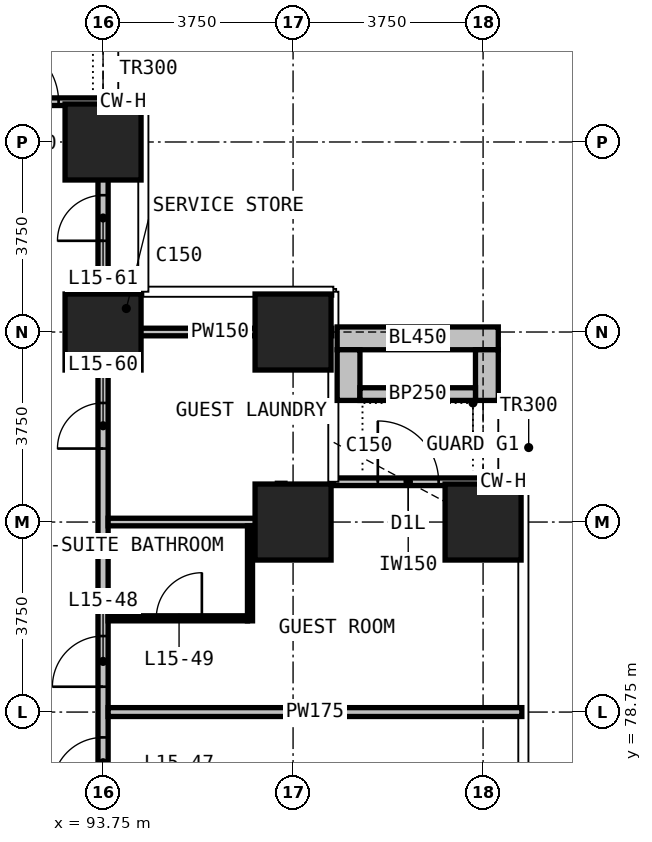
"""IFC4 building model, lengths in metres.
Left out: names, types, materials, properties, quantities, classifications, styles, units other than length and angle.
Written with IfcOpenShell. Run it as: python <this file> out.ifc"""

import sys

from ifc_helpers import new_model, si_unit, direction, frame, frame_2d, origin, origin_2d, place, context, subcontext, project, spatial, rectangle, extrude, element, fill, save


model = new_model("IFC4")
c1 = context("Model", 3, precision=1e-05, world=origin(), true_north=direction((0.0, 1.0)))
c2 = subcontext(c1, "Body", "Model", "MODEL_VIEW")
j1 = project(units=[si_unit("LENGTHUNIT", "METRE"), si_unit("PLANEANGLEUNIT", "RADIAN")], contexts=[c1])
p1 = place(None, origin())
s1 = spatial("IfcSite", under=j1, at=p1, CompositionType="ELEMENT")
p2 = place(p1, origin())
s2 = spatial("IfcBuilding", under=s1, at=p2, CompositionType="ELEMENT")
p3 = place(p2, frame((0.0, 0.0, 69.2)))
s3 = spatial("IfcBuildingStorey", under=s2, at=p3, CompositionType="ELEMENT", Elevation=69.2)
for number, where, z_axis, x_axis in (
    (1, (93.75, 86.25, 0.0), (0.0, 0.0, 1.0), (1.0, 0.0, 0.0)),
    (2, (93.75, 90.0, 0.0), (0.0, 0.0, 1.0), (1.0, 0.0, 0.0)),
    (3, (97.5, 82.5, 0.0), (0.0, 0.0, 1.0), (1.0, 0.0, 0.0)),
    (4, (97.5, 86.25, 0.0), (0.0, 0.0, 1.0), (1.0, 0.0, 0.0)),
    (5, (101.25, 82.5, 0.0), (0.0, 0.0, 1.0), (1.0, 0.0, 0.0)),
):
    element("IfcColumn", number, at=place(p3, frame(where, z_axis=z_axis, x_axis=x_axis)), inside=s3, PredefinedType="COLUMN", context=c2, shape_type="SweptSolid", body=[
        extrude(rectangle(XDim=1.5, YDim=1.5, at=origin_2d()), origin(), (0.0, 0.0, 1.0), 3.3),
    ])
p4 = place(p3, frame((98.295, 83.295, 0.0), z_axis=(0.0, 0.0, 1.0), x_axis=(1.0, 0.0, 0.0)))
e6 = element("IfcWall", 6, at=p4, inside=s3, PredefinedType="SOLIDWALL", context=c2, shape_type="SweptSolid", body=[
    extrude(rectangle(XDim=2.955, YDim=0.15, at=frame_2d((1.478, 0.0))), origin(), (0.0, 0.0, 1.0), 3.0),
])
p5 = place(p4, frame((0.877, 0.0, 0.0)))
e7 = element("IfcOpeningElement", 7, at=p5, cuts=e6, PredefinedType="OPENING", context=c2, shape_type="SweptSolid", body=[
    extrude(rectangle(XDim=1.2, YDim=2.0, at=frame_2d((0.6, 1.0))), frame((0.0, 0.085, 0.0), z_axis=(0.0, -1.0, 0.0), x_axis=(1.0, 0.0, 0.0)), (0.0, 0.0, 1.0), 0.17),
])
p6 = place(p3, frame((90.795, 90.795, 0.0), z_axis=(0.0, 0.0, 1.0), x_axis=(1.0, 0.0, 0.0)))
e8 = element("IfcWall", 8, at=p6, inside=s3, PredefinedType="SOLIDWALL", context=c2, shape_type="SweptSolid", body=[
    extrude(rectangle(XDim=2.955, YDim=0.15, at=frame_2d((1.478, 0.0))), origin(), (0.0, 0.0, 1.0), 3.0),
])
p7 = place(p6, frame((0.877, 0.0, 0.0)))
e9 = element("IfcOpeningElement", 9, at=p7, cuts=e8, PredefinedType="OPENING", context=c2, shape_type="SweptSolid", body=[
    extrude(rectangle(XDim=1.2, YDim=2.4, at=frame_2d((0.6, 1.2))), frame((0.0, 0.085, 0.0), z_axis=(0.0, -1.0, 0.0), x_axis=(1.0, 0.0, 0.0)), (0.0, 0.0, 1.0), 0.17),
])
p8 = place(p3, frame((98.37, 86.125, 0.0), z_axis=(0.0, 0.0, 1.0), x_axis=(1.0, 0.0, 0.0)))
e10 = element("IfcWall", 10, at=p8, inside=s3, PredefinedType="USERDEFINED", context=c2, shape_type="SweptSolid", body=[
    extrude(rectangle(XDim=3.18, YDim=0.45, at=frame_2d((1.59, 0.0))), origin(), (0.0, 0.0, 1.0), 1.1),
])
for number, where, z_axis, x_axis in (
    (11, (98.595, 84.9, 0.0), (0.0, 0.0, 1.0), (0.0, 1.0, 0.0)),
    (12, (101.325, 84.9, 0.0), (0.0, 0.0, 1.0), (0.0, 1.0, 0.0)),
):
    element("IfcWall", number, at=place(p3, frame(where, z_axis=z_axis, x_axis=x_axis)), inside=s3, PredefinedType="USERDEFINED", context=c2, shape_type="SweptSolid", body=[
        extrude(rectangle(XDim=1.0, YDim=0.45, at=frame_2d((0.5, 0.0))), origin(), (0.0, 0.0, 1.0), 1.1),
    ])
p9 = place(p3, frame((98.82, 85.025, 0.0), z_axis=(0.0, 0.0, 1.0), x_axis=(1.0, 0.0, 0.0)))
e13 = element("IfcWall", 13, at=p9, inside=s3, PredefinedType="USERDEFINED", context=c2, shape_type="SweptSolid", body=[
    extrude(rectangle(XDim=2.28, YDim=0.25, at=frame_2d((1.14, 0.0))), origin(), (0.0, 0.0, 1.0), 1.0),
])
p10 = place(p3, frame((93.75, 52.4, 0.0), z_axis=(0.0, 0.0, 1.0), x_axis=(0.0, 1.0, 0.0)))
e14 = element("IfcWall", 14, at=p10, inside=s3, PredefinedType="PARTITIONING", context=c2, shape_type="SweptSolid", body=[
    extrude(rectangle(XDim=38.31, YDim=0.2, at=frame_2d((19.155, 0.0))), origin(), (0.0, 0.0, 1.0), 3.0),
])
p11 = place(p10, frame((5.5, 0.0, 0.0)))
e15 = element("IfcOpeningElement", 15, at=p11, cuts=e14, PredefinedType="OPENING", context=c2, shape_type="SweptSolid", body=[
    extrude(rectangle(XDim=1.0, YDim=2.2, at=frame_2d((0.5, 1.1))), frame((0.0, 0.11, 0.0), z_axis=(0.0, -1.0, 0.0), x_axis=(1.0, 0.0, 0.0)), (0.0, 0.0, 1.0), 0.22),
])
p12 = place(p10, frame((8.1, 0.0, 0.0)))
e16 = element("IfcOpeningElement", 16, at=p12, cuts=e14, PredefinedType="OPENING", context=c2, shape_type="SweptSolid", body=[
    extrude(rectangle(XDim=1.0, YDim=2.2, at=frame_2d((0.5, 1.1))), frame((0.0, 0.11, 0.0), z_axis=(0.0, -1.0, 0.0), x_axis=(1.0, 0.0, 0.0)), (0.0, 0.0, 1.0), 0.22),
])
p13 = place(p10, frame((13.6, 0.0, 0.0)))
e17 = element("IfcOpeningElement", 17, at=p13, cuts=e14, PredefinedType="OPENING", context=c2, shape_type="SweptSolid", body=[
    extrude(rectangle(XDim=1.0, YDim=2.2, at=frame_2d((0.5, 1.1))), frame((0.0, 0.11, 0.0), z_axis=(0.0, -1.0, 0.0), x_axis=(1.0, 0.0, 0.0)), (0.0, 0.0, 1.0), 0.22),
])
p14 = place(p10, frame((16.2, 0.0, 0.0)))
e18 = element("IfcOpeningElement", 18, at=p14, cuts=e14, PredefinedType="OPENING", context=c2, shape_type="SweptSolid", body=[
    extrude(rectangle(XDim=1.0, YDim=2.2, at=frame_2d((0.5, 1.1))), frame((0.0, 0.11, 0.0), z_axis=(0.0, -1.0, 0.0), x_axis=(1.0, 0.0, 0.0)), (0.0, 0.0, 1.0), 0.22),
])
p15 = place(p10, frame((24.85, 0.0, 0.0)))
e19 = element("IfcOpeningElement", 19, at=p15, cuts=e14, PredefinedType="OPENING", context=c2, shape_type="SweptSolid", body=[
    extrude(rectangle(XDim=1.0, YDim=2.2, at=frame_2d((0.5, 1.1))), frame((0.0, 0.11, 0.0), z_axis=(0.0, -1.0, 0.0), x_axis=(1.0, 0.0, 0.0)), (0.0, 0.0, 1.0), 0.22),
])
p16 = place(p10, frame((26.85, 0.0, 0.0)))
e20 = element("IfcOpeningElement", 20, at=p16, cuts=e14, PredefinedType="OPENING", context=c2, shape_type="SweptSolid", body=[
    extrude(rectangle(XDim=1.0, YDim=2.2, at=frame_2d((0.5, 1.1))), frame((0.0, 0.11, 0.0), z_axis=(0.0, -1.0, 0.0), x_axis=(1.0, 0.0, 0.0)), (0.0, 0.0, 1.0), 0.22),
])
p17 = place(p10, frame((31.55, 0.0, 0.0)))
e21 = element("IfcOpeningElement", 21, at=p17, cuts=e14, PredefinedType="OPENING", context=c2, shape_type="SweptSolid", body=[
    extrude(rectangle(XDim=0.9, YDim=2.2, at=frame_2d((0.45, 1.1))), frame((0.0, 0.11, 0.0), z_axis=(0.0, -1.0, 0.0), x_axis=(1.0, 0.0, 0.0)), (0.0, 0.0, 1.0), 0.22),
])
p18 = place(p10, frame((35.65, 0.0, 0.0)))
e22 = element("IfcOpeningElement", 22, at=p18, cuts=e14, PredefinedType="OPENING", context=c2, shape_type="SweptSolid", body=[
    extrude(rectangle(XDim=0.9, YDim=2.2, at=frame_2d((0.45, 1.1))), frame((0.0, 0.11, 0.0), z_axis=(0.0, -1.0, 0.0), x_axis=(1.0, 0.0, 0.0)), (0.0, 0.0, 1.0), 0.22),
])
p19 = place(p3, frame((93.85, 78.75, 0.0), z_axis=(0.0, 0.0, 1.0), x_axis=(1.0, 0.0, 0.0)))
e23 = element("IfcWall", 23, at=p19, inside=s3, PredefinedType="PARTITIONING", context=c2, shape_type="SweptSolid", body=[
    extrude(rectangle(XDim=8.165, YDim=0.175, at=frame_2d((4.083, 0.0))), origin(), (0.0, 0.0, 1.0), 3.0),
])
p20 = place(p3, frame((93.85, 82.5, 0.0), z_axis=(0.0, 0.0, 1.0), x_axis=(1.0, 0.0, 0.0)))
e24 = element("IfcWall", 24, at=p20, inside=s3, PredefinedType="PARTITIONING", context=c2, shape_type="SweptSolid", body=[
    extrude(rectangle(XDim=3.34, YDim=0.15, at=frame_2d((1.67, 0.0))), origin(), (0.0, 0.0, 1.0), 3.0),
])
p21 = place(p3, frame((93.85, 86.25, 0.0), z_axis=(0.0, 0.0, 1.0), x_axis=(1.0, 0.0, 0.0)))
e25 = element("IfcWall", 25, at=p21, inside=s3, PredefinedType="PARTITIONING", context=c2, shape_type="SweptSolid", body=[
    extrude(rectangle(XDim=4.415, YDim=0.15, at=frame_2d((2.208, 0.0))), origin(), (0.0, 0.0, 1.0), 3.0),
])
p22 = place(p3, frame((97.265, 82.425, 0.0), z_axis=(0.0, 0.0, 1.0), x_axis=(0.0, 1.0, 0.0)))
e26 = element("IfcWall", 26, at=p22, inside=s3, PredefinedType="PARTITIONING", context=c2, shape_type="SweptSolid", body=[
    extrude(rectangle(XDim=0.84, YDim=0.15, at=frame_2d((0.42, 0.0))), origin(), (0.0, 0.0, 1.0), 3.0),
])
p23 = place(p3, frame((93.85, 80.6, 0.0), z_axis=(0.0, 0.0, 1.0), x_axis=(1.0, 0.0, 0.0)))
e27 = element("IfcWall", 27, at=p23, inside=s3, PredefinedType="PARTITIONING", context=c2, shape_type="SweptSolid", body=[
    extrude(rectangle(XDim=2.75, YDim=0.1, at=frame_2d((1.375, 0.0))), origin(), (0.0, 0.0, 1.0), 3.0),
])
p24 = place(p23, frame((0.95, 0.0, 0.0)))
e28 = element("IfcOpeningElement", 28, at=p24, cuts=e27, PredefinedType="OPENING", context=c2, shape_type="SweptSolid", body=[
    extrude(rectangle(XDim=0.9, YDim=2.2, at=frame_2d((0.45, 1.1))), frame((0.0, 0.06, 0.0), z_axis=(0.0, -1.0, 0.0), x_axis=(1.0, 0.0, 0.0)), (0.0, 0.0, 1.0), 0.12),
])
p25 = place(p3, frame((96.65, 80.55, 0.0), z_axis=(0.0, 0.0, 1.0), x_axis=(0.0, 1.0, 0.0)))
e29 = element("IfcWall", 29, at=p25, inside=s3, PredefinedType="PARTITIONING", context=c2, shape_type="SweptSolid", body=[
    extrude(rectangle(XDim=1.875, YDim=0.1, at=frame_2d((0.938, 0.0))), origin(), (0.0, 0.0, 1.0), 3.0),
])
p26 = place(p5, origin())
e30 = element("IfcDoor", 30, at=p26, inside=s3, OperationType="SINGLE_SWING_LEFT", PredefinedType="DOOR", context=c2, shape_type="SweptSolid", body=[
    extrude(rectangle(XDim=1.2, YDim=2.0, at=frame_2d((0.6, 1.0))), frame((0.0, 0.025, 0.0), z_axis=(0.0, -1.0, 0.0), x_axis=(1.0, 0.0, 0.0)), (0.0, 0.0, 1.0), 0.05),
])
fill(e7, e30)
p27 = place(p7, origin())
e31 = element("IfcDoor", 31, at=p27, inside=s3, OperationType="SINGLE_SWING_LEFT", PredefinedType="DOOR", context=c2, shape_type="SweptSolid", body=[
    extrude(rectangle(XDim=1.2, YDim=2.4, at=frame_2d((0.6, 1.2))), frame((0.0, 0.025, 0.0), z_axis=(0.0, -1.0, 0.0), x_axis=(1.0, 0.0, 0.0)), (0.0, 0.0, 1.0), 0.05),
])
fill(e9, e31)
p28 = place(p15, origin())
e32 = element("IfcDoor", 32, at=p28, inside=s3, OperationType="SINGLE_SWING_LEFT", PredefinedType="DOOR", context=c2, shape_type="SweptSolid", body=[
    extrude(rectangle(XDim=1.0, YDim=2.2, at=frame_2d((0.5, 1.1))), frame((0.0, 0.025, 0.0), z_axis=(0.0, -1.0, 0.0), x_axis=(1.0, 0.0, 0.0)), (0.0, 0.0, 1.0), 0.05),
])
fill(e19, e32)
p29 = place(p16, origin())
e33 = element("IfcDoor", 33, at=p29, inside=s3, OperationType="SINGLE_SWING_LEFT", PredefinedType="DOOR", context=c2, shape_type="SweptSolid", body=[
    extrude(rectangle(XDim=1.0, YDim=2.2, at=frame_2d((0.5, 1.1))), frame((0.0, 0.025, 0.0), z_axis=(0.0, -1.0, 0.0), x_axis=(1.0, 0.0, 0.0)), (0.0, 0.0, 1.0), 0.05),
])
fill(e20, e33)
p30 = place(p24, origin())
e34 = element("IfcDoor", 34, at=p30, inside=s3, OperationType="SINGLE_SWING_RIGHT", PredefinedType="DOOR", context=c2, shape_type="SweptSolid", body=[
    extrude(rectangle(XDim=0.9, YDim=2.2, at=frame_2d((0.45, 1.1))), frame((0.0, 0.025, 0.0), z_axis=(0.0, -1.0, 0.0), x_axis=(1.0, 0.0, 0.0)), (0.0, 0.0, 1.0), 0.05),
])
fill(e28, e34)
p31 = place(p17, origin())
e35 = element("IfcDoor", 35, at=p31, inside=s3, OperationType="SINGLE_SWING_LEFT", PredefinedType="DOOR", context=c2, shape_type="SweptSolid", body=[
    extrude(rectangle(XDim=0.9, YDim=2.2, at=frame_2d((0.45, 1.1))), frame((0.0, 0.025, 0.0), z_axis=(0.0, -1.0, 0.0), x_axis=(1.0, 0.0, 0.0)), (0.0, 0.0, 1.0), 0.05),
])
fill(e21, e35)
p32 = place(p18, origin())
e36 = element("IfcDoor", 36, at=p32, inside=s3, OperationType="SINGLE_SWING_RIGHT", PredefinedType="DOOR", context=c2, shape_type="SweptSolid", body=[
    extrude(rectangle(XDim=0.9, YDim=2.2, at=frame_2d((0.45, 1.1))), frame((0.0, 0.025, 0.0), z_axis=(0.0, -1.0, 0.0), x_axis=(1.0, 0.0, 0.0)), (0.0, 0.0, 1.0), 0.05),
])
fill(e22, e36)
save(model, sys.argv[1])
